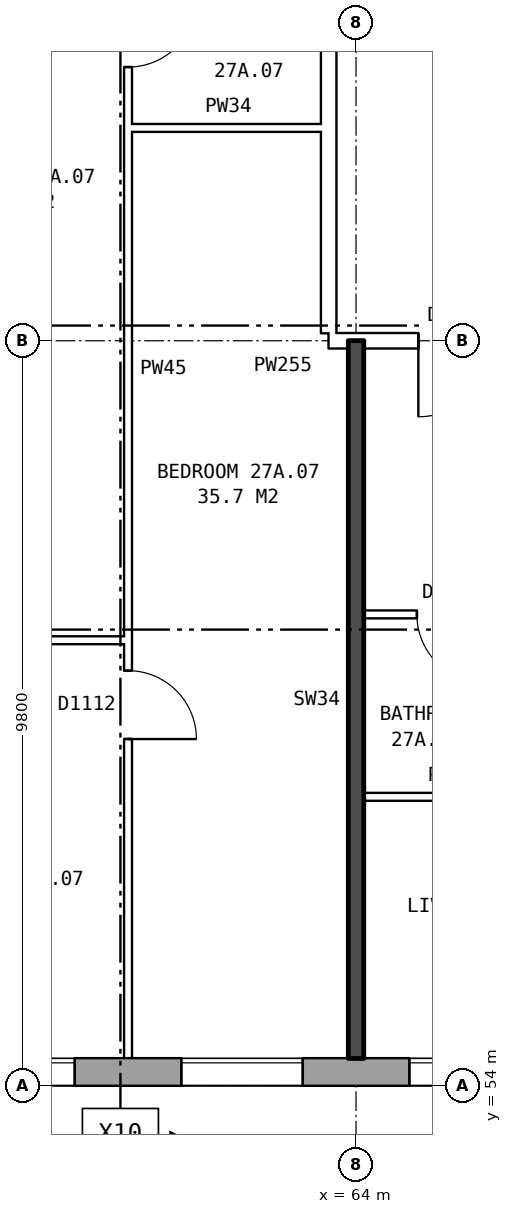
"""IFC4 building model, lengths in metres.
Left out: names, types, materials, properties, quantities, classifications, styles, units other than length and angle.
Written with IfcOpenShell. Run it as: python <this file> out.ifc"""

import sys

from ifc_helpers import new_model, si_unit, direction, frame, frame_2d, origin, place, context, subcontext, project, spatial, rectangle, extrude, element, fill, save


model = new_model("IFC4")
c1 = context("Model", 3, precision=1e-05, world=origin(), true_north=direction((0.0, 1.0)))
c2 = subcontext(c1, "Body", "Model", "MODEL_VIEW")
j1 = project(units=[si_unit("LENGTHUNIT", "METRE"), si_unit("PLANEANGLEUNIT", "RADIAN")], contexts=[c1])
p1 = place(None, origin())
s1 = spatial("IfcSite", under=j1, at=p1, CompositionType="ELEMENT")
p2 = place(p1, origin())
s2 = spatial("IfcBuilding", under=s1, at=p2, CompositionType="ELEMENT")
p3 = place(p2, frame((0.0, 0.0, 99.5)))
s3 = spatial("IfcBuildingStorey", under=s2, at=p3, CompositionType="ELEMENT", Elevation=99.5)
p4 = place(p3, frame((28.075, 54.18, 0.0), z_axis=(0.0, 0.0, 1.0), x_axis=(1.0, 0.0, 0.0)))
e1 = element("IfcWall", 1, at=p4, inside=s3, PredefinedType="STANDARD", context=c2, shape_type="SweptSolid", body=[
    extrude(rectangle(XDim=44.851, YDim=0.36, at=frame_2d((22.425, 0.0))), origin(), (0.0, 0.0, 1.0), 2.85),
])
p5 = place(p4, frame((0.625, 0.0, 0.8)))
e2 = element("IfcOpeningElement", 2, at=p5, cuts=e1, PredefinedType="OPENING", context=c2, shape_type="SweptSolid", body=[
    extrude(rectangle(XDim=1.6, YDim=1.8, at=frame_2d((0.8, 0.9))), frame((0.0, 0.19, 0.0), z_axis=(0.0, -1.0, 0.0), x_axis=(1.0, 0.0, 0.0)), (0.0, 0.0, 1.0), 0.38),
])
p6 = place(p4, frame((2.55, 0.0, 1.7)))
e3 = element("IfcOpeningElement", 3, at=p6, cuts=e1, PredefinedType="OPENING", context=c2, shape_type="SweptSolid", body=[
    extrude(rectangle(XDim=0.8, YDim=0.9, at=frame_2d((0.4, 0.45))), frame((0.0, 0.19, 0.0), z_axis=(0.0, -1.0, 0.0), x_axis=(1.0, 0.0, 0.0)), (0.0, 0.0, 1.0), 0.38),
])
p7 = place(p4, frame((6.625, 0.0, 0.8)))
e4 = element("IfcOpeningElement", 4, at=p7, cuts=e1, PredefinedType="OPENING", context=c2, shape_type="SweptSolid", body=[
    extrude(rectangle(XDim=1.6, YDim=1.8, at=frame_2d((0.8, 0.9))), frame((0.0, 0.19, 0.0), z_axis=(0.0, -1.0, 0.0), x_axis=(1.0, 0.0, 0.0)), (0.0, 0.0, 1.0), 0.38),
])
p8 = place(p4, frame((9.625, 0.0, 0.8)))
e5 = element("IfcOpeningElement", 5, at=p8, cuts=e1, PredefinedType="OPENING", context=c2, shape_type="SweptSolid", body=[
    extrude(rectangle(XDim=1.6, YDim=1.8, at=frame_2d((0.8, 0.9))), frame((0.0, 0.19, 0.0), z_axis=(0.0, -1.0, 0.0), x_axis=(1.0, 0.0, 0.0)), (0.0, 0.0, 1.0), 0.38),
])
p9 = place(p4, frame((12.625, 0.0, 0.8)))
e6 = element("IfcOpeningElement", 6, at=p9, cuts=e1, PredefinedType="OPENING", context=c2, shape_type="SweptSolid", body=[
    extrude(rectangle(XDim=1.6, YDim=1.8, at=frame_2d((0.8, 0.9))), frame((0.0, 0.19, 0.0), z_axis=(0.0, -1.0, 0.0), x_axis=(1.0, 0.0, 0.0)), (0.0, 0.0, 1.0), 0.38),
])
p10 = place(p4, frame((15.625, 0.0, 0.8)))
e7 = element("IfcOpeningElement", 7, at=p10, cuts=e1, PredefinedType="OPENING", context=c2, shape_type="SweptSolid", body=[
    extrude(rectangle(XDim=1.6, YDim=1.8, at=frame_2d((0.8, 0.9))), frame((0.0, 0.19, 0.0), z_axis=(0.0, -1.0, 0.0), x_axis=(1.0, 0.0, 0.0)), (0.0, 0.0, 1.0), 0.38),
])
p11 = place(p4, frame((18.625, 0.0, 0.8)))
e8 = element("IfcOpeningElement", 8, at=p11, cuts=e1, PredefinedType="OPENING", context=c2, shape_type="SweptSolid", body=[
    extrude(rectangle(XDim=1.6, YDim=1.8, at=frame_2d((0.8, 0.9))), frame((0.0, 0.19, 0.0), z_axis=(0.0, -1.0, 0.0), x_axis=(1.0, 0.0, 0.0)), (0.0, 0.0, 1.0), 0.38),
])
p12 = place(p4, frame((21.625, 0.0, 0.8)))
e9 = element("IfcOpeningElement", 9, at=p12, cuts=e1, PredefinedType="OPENING", context=c2, shape_type="SweptSolid", body=[
    extrude(rectangle(XDim=1.6, YDim=1.8, at=frame_2d((0.8, 0.9))), frame((0.0, 0.19, 0.0), z_axis=(0.0, -1.0, 0.0), x_axis=(1.0, 0.0, 0.0)), (0.0, 0.0, 1.0), 0.38),
])
p13 = place(p4, frame((24.625, 0.0, 0.8)))
e10 = element("IfcOpeningElement", 10, at=p13, cuts=e1, PredefinedType="OPENING", context=c2, shape_type="SweptSolid", body=[
    extrude(rectangle(XDim=1.6, YDim=1.8, at=frame_2d((0.8, 0.9))), frame((0.0, 0.19, 0.0), z_axis=(0.0, -1.0, 0.0), x_axis=(1.0, 0.0, 0.0)), (0.0, 0.0, 1.0), 0.38),
])
p14 = place(p4, frame((27.625, 0.0, 0.8)))
e11 = element("IfcOpeningElement", 11, at=p14, cuts=e1, PredefinedType="OPENING", context=c2, shape_type="SweptSolid", body=[
    extrude(rectangle(XDim=1.6, YDim=1.8, at=frame_2d((0.8, 0.9))), frame((0.0, 0.19, 0.0), z_axis=(0.0, -1.0, 0.0), x_axis=(1.0, 0.0, 0.0)), (0.0, 0.0, 1.0), 0.38),
])
p15 = place(p4, frame((30.625, 0.0, 0.8)))
e12 = element("IfcOpeningElement", 12, at=p15, cuts=e1, PredefinedType="OPENING", context=c2, shape_type="SweptSolid", body=[
    extrude(rectangle(XDim=1.6, YDim=1.8, at=frame_2d((0.8, 0.9))), frame((0.0, 0.19, 0.0), z_axis=(0.0, -1.0, 0.0), x_axis=(1.0, 0.0, 0.0)), (0.0, 0.0, 1.0), 0.38),
])
p16 = place(p4, frame((33.625, 0.0, 0.8)))
e13 = element("IfcOpeningElement", 13, at=p16, cuts=e1, PredefinedType="OPENING", context=c2, shape_type="SweptSolid", body=[
    extrude(rectangle(XDim=1.6, YDim=1.8, at=frame_2d((0.8, 0.9))), frame((0.0, 0.19, 0.0), z_axis=(0.0, -1.0, 0.0), x_axis=(1.0, 0.0, 0.0)), (0.0, 0.0, 1.0), 0.38),
])
p17 = place(p4, frame((36.625, 0.0, 0.8)))
e14 = element("IfcOpeningElement", 14, at=p17, cuts=e1, PredefinedType="OPENING", context=c2, shape_type="SweptSolid", body=[
    extrude(rectangle(XDim=1.6, YDim=1.8, at=frame_2d((0.8, 0.9))), frame((0.0, 0.19, 0.0), z_axis=(0.0, -1.0, 0.0), x_axis=(1.0, 0.0, 0.0)), (0.0, 0.0, 1.0), 0.38),
])
p18 = place(p4, frame((38.525, 0.0, 0.8)))
e15 = element("IfcOpeningElement", 15, at=p18, cuts=e1, PredefinedType="OPENING", context=c2, shape_type="SweptSolid", body=[
    extrude(rectangle(XDim=1.2, YDim=1.2, at=frame_2d((0.6, 0.6))), frame((0.0, 0.19, 0.0), z_axis=(0.0, -1.0, 0.0), x_axis=(1.0, 0.0, 0.0)), (0.0, 0.0, 1.0), 0.38),
])
p19 = place(p4, frame((42.625, 0.0, 0.8)))
e16 = element("IfcOpeningElement", 16, at=p19, cuts=e1, PredefinedType="OPENING", context=c2, shape_type="SweptSolid", body=[
    extrude(rectangle(XDim=1.6, YDim=1.8, at=frame_2d((0.8, 0.9))), frame((0.0, 0.19, 0.0), z_axis=(0.0, -1.0, 0.0), x_axis=(1.0, 0.0, 0.0)), (0.0, 0.0, 1.0), 0.38),
])
p20 = place(p4, frame((4.65, 0.0, 0.8)))
e17 = element("IfcOpeningElement", 17, at=p20, cuts=e1, PredefinedType="OPENING", context=c2, shape_type="SweptSolid", body=[
    extrude(rectangle(XDim=1.0, YDim=0.9, at=frame_2d((0.5, 0.45))), frame((0.0, 0.19, 0.0), z_axis=(0.0, -1.0, 0.0), x_axis=(1.0, 0.0, 0.0)), (0.0, 0.0, 1.0), 0.38),
])
p21 = place(p3, frame((63.64, 63.9, 0.0), z_axis=(0.0, 0.0, 1.0), x_axis=(0.0, 1.0, 0.0)))
e18 = element("IfcWall", 18, at=p21, inside=s3, PredefinedType="PARTITIONING", context=c2, shape_type="SweptSolid", body=[
    extrude(rectangle(XDim=12.2, YDim=0.2, at=frame_2d((6.1, 0.0))), origin(), (0.0, 0.0, 1.0), 2.85),
])
p22 = place(p21, frame((5.1, 0.0, 0.0)))
e19 = element("IfcOpeningElement", 19, at=p22, cuts=e18, PredefinedType="OPENING", context=c2, shape_type="SweptSolid", body=[
    extrude(rectangle(XDim=2.0, YDim=2.1, at=frame_2d((1.0, 1.05))), frame((0.0, 0.11, 0.0), z_axis=(0.0, -1.0, 0.0), x_axis=(1.0, 0.0, 0.0)), (0.0, 0.0, 1.0), 0.22),
])
p23 = place(p3, frame((64.1, 57.8, 0.0), z_axis=(0.0, 0.0, 1.0), x_axis=(1.0, 0.0, 0.0)))
e20 = element("IfcWall", 20, at=p23, inside=s3, PredefinedType="PARTITIONING", context=c2, shape_type="SweptSolid", body=[
    extrude(rectangle(XDim=2.3, YDim=0.1, at=frame_2d((1.15, 0.0))), origin(), (0.0, 0.0, 1.0), 2.85),
])
p24 = place(p3, frame((55.0, 59.86, 0.0), z_axis=(0.0, 0.0, 1.0), x_axis=(1.0, 0.0, 0.0)))
e21 = element("IfcWall", 21, at=p24, inside=s3, PredefinedType="PARTITIONING", context=c2, shape_type="SweptSolid", body=[
    extrude(rectangle(XDim=6.0, YDim=0.1, at=frame_2d((3.0, 0.0))), origin(), (0.0, 0.0, 1.0), 2.85),
])
p25 = place(p24, frame((4.05, 0.0, 0.0)))
e22 = element("IfcOpeningElement", 22, at=p25, cuts=e21, PredefinedType="OPENING", context=c2, shape_type="SweptSolid", body=[
    extrude(rectangle(XDim=0.9, YDim=2.1, at=frame_2d((0.45, 1.05))), frame((0.0, 0.06, 0.0), z_axis=(0.0, -1.0, 0.0), x_axis=(1.0, 0.0, 0.0)), (0.0, 0.0, 1.0), 0.12),
])
p26 = place(p24, frame((1.05, 0.0, 0.0)))
e23 = element("IfcOpeningElement", 23, at=p26, cuts=e21, PredefinedType="OPENING", context=c2, shape_type="SweptSolid", body=[
    extrude(rectangle(XDim=0.9, YDim=2.1, at=frame_2d((0.45, 1.05))), frame((0.0, 0.06, 0.0), z_axis=(0.0, -1.0, 0.0), x_axis=(1.0, 0.0, 0.0)), (0.0, 0.0, 1.0), 0.12),
])
p27 = place(p3, frame((64.1, 60.2, 0.0), z_axis=(0.0, 0.0, 1.0), x_axis=(1.0, 0.0, 0.0)))
e24 = element("IfcWall", 24, at=p27, inside=s3, PredefinedType="PARTITIONING", context=c2, shape_type="SweptSolid", body=[
    extrude(rectangle(XDim=5.8, YDim=0.1, at=frame_2d((2.9, 0.0))), origin(), (0.0, 0.0, 1.0), 2.85),
])
p28 = place(p27, frame((3.6, 0.0, 0.0)))
e25 = element("IfcOpeningElement", 25, at=p28, cuts=e24, PredefinedType="OPENING", context=c2, shape_type="SweptSolid", body=[
    extrude(rectangle(XDim=0.9, YDim=2.1, at=frame_2d((0.45, 1.05))), frame((0.0, 0.06, 0.0), z_axis=(0.0, -1.0, 0.0), x_axis=(1.0, 0.0, 0.0)), (0.0, 0.0, 1.0), 0.12),
])
p29 = place(p27, frame((0.7, 0.0, 0.0)))
e26 = element("IfcOpeningElement", 26, at=p29, cuts=e24, PredefinedType="OPENING", context=c2, shape_type="SweptSolid", body=[
    extrude(rectangle(XDim=0.9, YDim=2.1, at=frame_2d((0.45, 1.05))), frame((0.0, 0.06, 0.0), z_axis=(0.0, -1.0, 0.0), x_axis=(1.0, 0.0, 0.0)), (0.0, 0.0, 1.0), 0.12),
])
p30 = place(p3, frame((63.64, 63.8, 0.0), z_axis=(0.0, 0.0, 1.0), x_axis=(1.0, 0.0, 0.0)))
e27 = element("IfcWall", 27, at=p30, inside=s3, PredefinedType="PARTITIONING", context=c2, shape_type="SweptSolid", body=[
    extrude(rectangle(XDim=3.0, YDim=0.2, at=frame_2d((1.5, 0.0))), origin(), (0.0, 0.0, 1.0), 2.85),
])
p31 = place(p30, frame((1.18, 0.0, 0.0)))
e28 = element("IfcOpeningElement", 28, at=p31, cuts=e27, PredefinedType="OPENING", context=c2, shape_type="SweptSolid", body=[
    extrude(rectangle(XDim=1.0, YDim=2.1, at=frame_2d((0.5, 1.05))), frame((0.0, 0.11, 0.0), z_axis=(0.0, -1.0, 0.0), x_axis=(1.0, 0.0, 0.0)), (0.0, 0.0, 1.0), 0.22),
])
p32 = place(p3, frame((61.0, 66.6, 0.0), z_axis=(0.0, 0.0, 1.0), x_axis=(1.0, 0.0, 0.0)))
e29 = element("IfcWall", 29, at=p32, inside=s3, PredefinedType="PARTITIONING", context=c2, shape_type="SweptSolid", body=[
    extrude(rectangle(XDim=2.64, YDim=0.1, at=frame_2d((1.32, 0.0))), origin(), (0.0, 0.0, 1.0), 2.85),
])
p33 = place(p3, frame((61.0, 54.36, 0.0), z_axis=(0.0, 0.0, 1.0), x_axis=(0.0, 1.0, 0.0)))
e30 = element("IfcWall", 30, at=p33, inside=s3, PredefinedType="PARTITIONING", context=c2, shape_type="SweptSolid", body=[
    extrude(rectangle(XDim=14.34, YDim=0.1, at=frame_2d((7.17, 0.0))), origin(), (0.0, 0.0, 1.0), 2.85),
])
p34 = place(p33, frame((4.2, 0.0, 0.0)))
e31 = element("IfcOpeningElement", 31, at=p34, cuts=e30, PredefinedType="OPENING", context=c2, shape_type="SweptSolid", body=[
    extrude(rectangle(XDim=0.9, YDim=2.1, at=frame_2d((0.45, 1.05))), frame((0.0, 0.06, 0.0), z_axis=(0.0, -1.0, 0.0), x_axis=(1.0, 0.0, 0.0)), (0.0, 0.0, 1.0), 0.12),
])
p35 = place(p33, frame((13.04, 0.0, 0.0)))
e32 = element("IfcOpeningElement", 32, at=p35, cuts=e30, PredefinedType="OPENING", context=c2, shape_type="SweptSolid", body=[
    extrude(rectangle(XDim=0.9, YDim=2.1, at=frame_2d((0.45, 1.05))), frame((0.0, 0.06, 0.0), z_axis=(0.0, -1.0, 0.0), x_axis=(1.0, 0.0, 0.0)), (0.0, 0.0, 1.0), 0.12),
])
p36 = place(p3, frame((64.0, 54.36, 0.0), z_axis=(0.0, 0.0, 1.0), x_axis=(0.0, 1.0, 0.0)))
e33 = element("IfcWall", 33, at=p36, inside=s3, PredefinedType="SOLIDWALL", context=c2, shape_type="SweptSolid", body=[
    extrude(rectangle(XDim=9.44, YDim=0.2, at=frame_2d((4.72, 0.0))), origin(), (0.0, 0.0, 1.0), 2.85),
])
p37 = place(p15, origin())
e34 = element("IfcWindow", 34, at=p37, inside=s3, PartitioningType="SINGLE_PANEL", PredefinedType="WINDOW", context=c2, shape_type="SweptSolid", body=[
    extrude(rectangle(XDim=1.6, YDim=1.8, at=frame_2d((0.8, 0.9))), frame((0.0, 0.15, 0.0), z_axis=(0.0, -1.0, 0.0), x_axis=(1.0, 0.0, 0.0)), (0.0, 0.0, 1.0), 0.06),
])
fill(e12, e34)
p38 = place(p16, origin())
e35 = element("IfcWindow", 35, at=p38, inside=s3, PartitioningType="SINGLE_PANEL", PredefinedType="WINDOW", context=c2, shape_type="SweptSolid", body=[
    extrude(rectangle(XDim=1.6, YDim=1.8, at=frame_2d((0.8, 0.9))), frame((0.0, 0.15, 0.0), z_axis=(0.0, -1.0, 0.0), x_axis=(1.0, 0.0, 0.0)), (0.0, 0.0, 1.0), 0.06),
])
fill(e13, e35)
p39 = place(p17, origin())
e36 = element("IfcWindow", 36, at=p39, inside=s3, PartitioningType="SINGLE_PANEL", PredefinedType="WINDOW", context=c2, shape_type="SweptSolid", body=[
    extrude(rectangle(XDim=1.6, YDim=1.8, at=frame_2d((0.8, 0.9))), frame((0.0, 0.15, 0.0), z_axis=(0.0, -1.0, 0.0), x_axis=(1.0, 0.0, 0.0)), (0.0, 0.0, 1.0), 0.06),
])
fill(e14, e36)
p40 = place(p31, frame((1.0, 0.0, 0.0), z_axis=(0.0, 0.0, 1.0), x_axis=(-1.0, 0.0, 0.0)))
e37 = element("IfcDoor", 37, at=p40, inside=s3, OperationType="SINGLE_SWING_RIGHT", PredefinedType="DOOR", context=c2, shape_type="SweptSolid", body=[
    extrude(rectangle(XDim=1.0, YDim=2.1, at=frame_2d((0.5, 1.05))), frame((0.0, 0.025, 0.0), z_axis=(0.0, -1.0, 0.0), x_axis=(1.0, 0.0, 0.0)), (0.0, 0.0, 1.0), 0.05),
])
fill(e28, e37)
p41 = place(p29, frame((0.9, 0.0, 0.0), z_axis=(0.0, 0.0, 1.0), x_axis=(-1.0, 0.0, 0.0)))
e38 = element("IfcDoor", 38, at=p41, inside=s3, OperationType="SINGLE_SWING_LEFT", PredefinedType="DOOR", context=c2, shape_type="SweptSolid", body=[
    extrude(rectangle(XDim=0.9, YDim=2.1, at=frame_2d((0.45, 1.05))), frame((0.0, 0.025, 0.0), z_axis=(0.0, -1.0, 0.0), x_axis=(1.0, 0.0, 0.0)), (0.0, 0.0, 1.0), 0.05),
])
fill(e26, e38)
p42 = place(p34, frame((0.9, 0.0, 0.0), z_axis=(0.0, 0.0, 1.0), x_axis=(-1.0, 0.0, 0.0)))
e39 = element("IfcDoor", 39, at=p42, inside=s3, OperationType="SINGLE_SWING_RIGHT", PredefinedType="DOOR", context=c2, shape_type="SweptSolid", body=[
    extrude(rectangle(XDim=0.9, YDim=2.1, at=frame_2d((0.45, 1.05))), frame((0.0, 0.025, 0.0), z_axis=(0.0, -1.0, 0.0), x_axis=(1.0, 0.0, 0.0)), (0.0, 0.0, 1.0), 0.05),
])
fill(e31, e39)
p43 = place(p35, frame((0.9, 0.0, 0.0), z_axis=(0.0, 0.0, 1.0), x_axis=(-1.0, 0.0, 0.0)))
e40 = element("IfcDoor", 40, at=p43, inside=s3, OperationType="SINGLE_SWING_LEFT", PredefinedType="DOOR", context=c2, shape_type="SweptSolid", body=[
    extrude(rectangle(XDim=0.9, YDim=2.1, at=frame_2d((0.45, 1.05))), frame((0.0, 0.025, 0.0), z_axis=(0.0, -1.0, 0.0), x_axis=(1.0, 0.0, 0.0)), (0.0, 0.0, 1.0), 0.05),
])
fill(e32, e40)
save(model, sys.argv[1])
